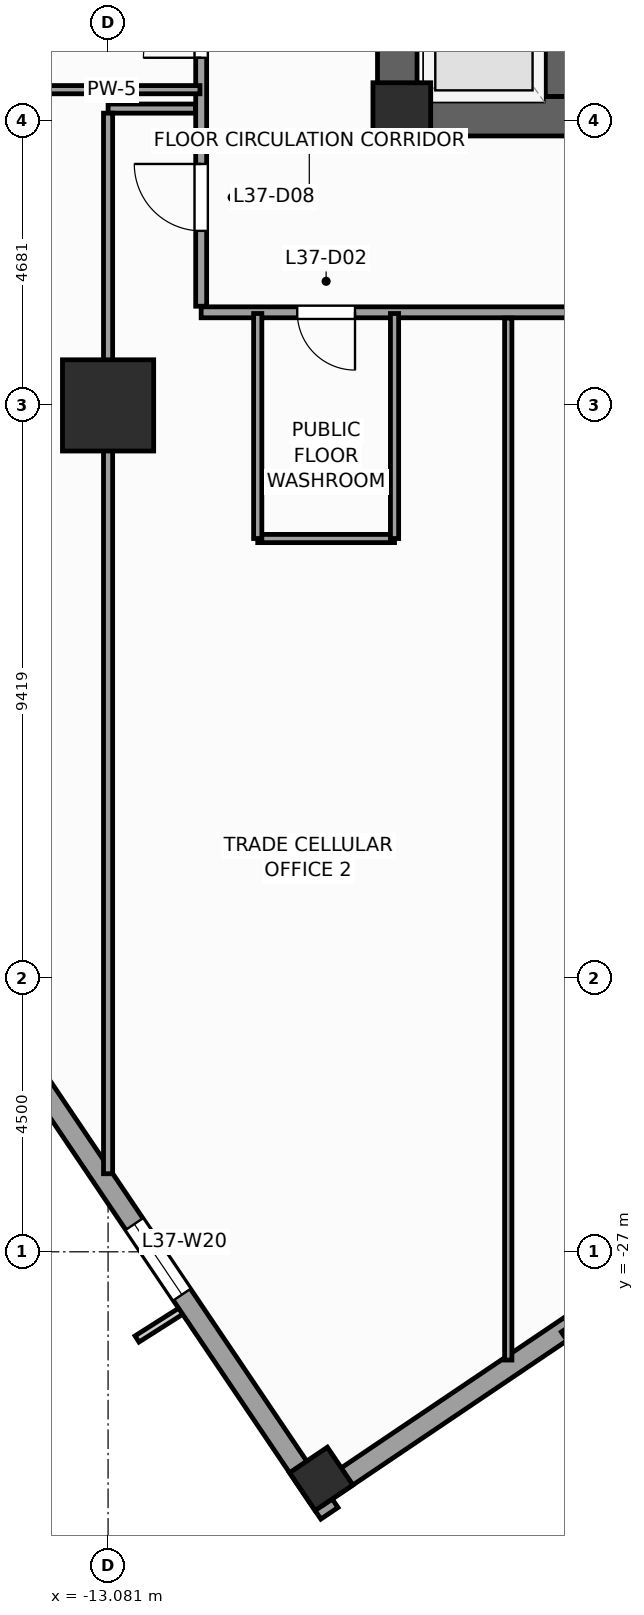
"""IFC4 building model, lengths in metres.
Left out: names, types, materials, properties, quantities, classifications, styles, units other than length and angle.
Written with IfcOpenShell. Run it as: python <this file> out.ifc"""

import sys

from ifc_helpers import new_model, si_unit, direction, frame, frame_2d, origin, origin_2d, place, context, subcontext, project, spatial, rectangle, extrude, source, transform, mapped, element, fill, save


model = new_model("IFC4")
c1 = context("Model", 3, precision=1e-05, world=origin(), true_north=direction((0.0, 1.0)))
c2 = subcontext(c1, "Body", "Model", "MODEL_VIEW")
j1 = project(units=[si_unit("LENGTHUNIT", "METRE"), si_unit("PLANEANGLEUNIT", "RADIAN")], contexts=[c1])
p1 = place(None, origin())
s1 = spatial("IfcSite", under=j1, at=p1, CompositionType="ELEMENT")
p2 = place(p1, origin())
s2 = spatial("IfcBuilding", under=s1, at=p2, CompositionType="ELEMENT")
p3 = place(p2, frame((0.0, 0.0, 156.4)))
s3 = spatial("IfcBuildingStorey", under=s2, at=p3, CompositionType="ELEMENT", Elevation=156.4)
p4 = place(p3, frame((-8.65, -8.325, 0.0), z_axis=(0.0, 0.0, 1.0), x_axis=(1.0, 0.0, 0.0)))
e1 = element("IfcWall", 1, at=p4, inside=s3, PredefinedType="SHEAR", context=c2, shape_type="SweptSolid", body=[
    extrude(rectangle(XDim=17.3, YDim=0.65, at=frame_2d((8.65, 0.0))), origin(), (0.0, 0.0, 1.0), 4.0),
])
p5 = place(p4, frame((8.0, 0.0, 0.0)))
e2 = element("IfcOpeningElement", 2, at=p5, cuts=e1, PredefinedType="OPENING", context=c2, shape_type="SweptSolid", body=[
    extrude(rectangle(XDim=1.3, YDim=2.2, at=frame_2d((0.65, 1.1))), frame((0.0, 0.335, 0.0), z_axis=(0.0, -1.0, 0.0), x_axis=(1.0, 0.0, 0.0)), (0.0, 0.0, 1.0), 0.67),
])
p6 = place(p3, frame((-8.325, -8.0, 0.0), z_axis=(0.0, 0.0, 1.0), x_axis=(0.0, 1.0, 0.0)))
e3 = element("IfcWall", 3, at=p6, inside=s3, PredefinedType="SHEAR", context=c2, shape_type="SweptSolid", body=[
    extrude(rectangle(XDim=16.0, YDim=0.65, at=frame_2d((8.0, 0.0))), origin(), (0.0, 0.0, 1.0), 4.0),
])
p7 = place(p6, frame((4.69, 0.0, 0.0)))
e4 = element("IfcOpeningElement", 4, at=p7, cuts=e3, PredefinedType="OPENING", context=c2, shape_type="SweptSolid", body=[
    extrude(rectangle(XDim=1.3, YDim=2.2, at=frame_2d((0.65, 1.1))), frame((0.0, 0.335, 0.0), z_axis=(0.0, -1.0, 0.0), x_axis=(1.0, 0.0, 0.0)), (0.0, 0.0, 1.0), 0.67),
])
p8 = place(p3, frame((-5.71, -8.0, 0.0), z_axis=(0.0, 0.0, 1.0), x_axis=(0.0, 1.0, 0.0)))
e5 = element("IfcWall", 5, at=p8, inside=s3, PredefinedType="SHEAR", context=c2, shape_type="SweptSolid", body=[
    extrude(rectangle(XDim=2.54, YDim=0.36, at=frame_2d((1.27, 0.0))), origin(), (0.0, 0.0, 1.0), 4.0),
])
m1 = source(origin(), c2, "Body", "SweptSolid", [
    extrude(rectangle(XDim=0.95, YDim=0.95, at=origin_2d()), origin(), (0.0, 0.0, 1.0), 4.0),
])
p9 = place(p3, frame((-8.25, -8.25, 0.0), z_axis=(0.0, 0.0, 1.0), x_axis=(1.0, 0.0, 0.0)))
e6 = element("IfcColumn", 6, at=p9, inside=s3, PredefinedType="PILASTER", context=c2, shape_type="MappedRepresentation", body=[
    mapped(m1, transform((0.0, 0.0, 0.0), scale=1.0)),
])
m2 = source(origin(), c2, "Body", "SweptSolid", [
    extrude(rectangle(XDim=1.5, YDim=1.5, at=origin_2d()), origin(), (0.0, 0.0, 1.0), 4.0),
])
p10 = place(p3, frame((-13.081, -13.081, 0.0), z_axis=(0.0, 0.0, 1.0), x_axis=(1.0, 0.0, 0.0)))
e7 = element("IfcColumn", 7, at=p10, inside=s3, PredefinedType="COLUMN", context=c2, shape_type="MappedRepresentation", body=[
    mapped(m2, transform((0.0, 0.0, 0.0), scale=1.0)),
])
m3 = source(origin(), c2, "Body", "SweptSolid", [
    extrude(rectangle(XDim=0.75, YDim=0.75, at=origin_2d()), origin(), (0.0, 0.0, 1.0), 4.0),
])
p11 = place(p3, frame((-9.576, -30.734, 0.0), z_axis=(0.0, 0.0, 1.0), x_axis=(0.829037572555, 0.559192903471, 0.0)))
e8 = element("IfcColumn", 8, at=p11, inside=s3, PredefinedType="COLUMN", context=c2, shape_type="MappedRepresentation", body=[
    mapped(m3, transform((0.0, 0.0, 0.0), scale=1.0)),
])
p12 = place(p3, frame((-32.558, 2.972, 0.0), z_axis=(0.0, 0.0, 1.0), x_axis=(0.559194910251, -0.829036218961, 0.0)))
e9 = element("IfcWall", 9, at=p12, inside=s3, PredefinedType="STANDARD", context=c2, shape_type="SweptSolid", body=[
    extrude(rectangle(XDim=41.34, YDim=0.34, at=frame_2d((20.67, 0.0))), origin(), (0.0, 0.0, 1.0), 3.04),
])
p13 = place(p12, frame((25.745, 0.0, 0.0)))
e10 = element("IfcOpeningElement", 10, at=p13, cuts=e9, PredefinedType="OPENING", context=c2, shape_type="SweptSolid", body=[
    extrude(rectangle(XDim=1.05, YDim=2.25, at=frame_2d((0.525, 1.125))), frame((0.0, 0.18, 0.0), z_axis=(0.0, -1.0, 0.0), x_axis=(1.0, 0.0, 0.0)), (0.0, 0.0, 1.0), 0.36),
])
p14 = place(p12, frame((5.761, 0.0, 0.56)))
e11 = element("IfcOpeningElement", 11, at=p14, cuts=e9, PredefinedType="OPENING", context=c2, shape_type="SweptSolid", body=[
    extrude(rectangle(XDim=1.4, YDim=2.4, at=frame_2d((0.7, 1.2))), frame((0.0, 0.18, 0.0), z_axis=(0.0, -1.0, 0.0), x_axis=(1.0, 0.0, 0.0)), (0.0, 0.0, 1.0), 0.36),
])
p15 = place(p12, frame((11.064, 0.0, 0.61)))
e12 = element("IfcOpeningElement", 12, at=p15, cuts=e9, PredefinedType="OPENING", context=c2, shape_type="SweptSolid", body=[
    extrude(rectangle(XDim=1.85, YDim=2.35, at=frame_2d((0.925, 1.175))), frame((0.0, 0.18, 0.0), z_axis=(0.0, -1.0, 0.0), x_axis=(1.0, 0.0, 0.0)), (0.0, 0.0, 1.0), 0.36),
])
p16 = place(p12, frame((18.168, 0.0, 0.61)))
e13 = element("IfcOpeningElement", 13, at=p16, cuts=e9, PredefinedType="OPENING", context=c2, shape_type="SweptSolid", body=[
    extrude(rectangle(XDim=1.85, YDim=2.35, at=frame_2d((0.925, 1.175))), frame((0.0, 0.18, 0.0), z_axis=(0.0, -1.0, 0.0), x_axis=(1.0, 0.0, 0.0)), (0.0, 0.0, 1.0), 0.36),
])
p17 = place(p12, frame((27.936, 0.0, 0.61)))
e14 = element("IfcOpeningElement", 14, at=p17, cuts=e9, PredefinedType="OPENING", context=c2, shape_type="SweptSolid", body=[
    extrude(rectangle(XDim=1.85, YDim=2.35, at=frame_2d((0.925, 1.175))), frame((0.0, 0.18, 0.0), z_axis=(0.0, -1.0, 0.0), x_axis=(1.0, 0.0, 0.0)), (0.0, 0.0, 1.0), 0.36),
])
p18 = place(p12, frame((35.602, 0.0, 0.56)))
e15 = element("IfcOpeningElement", 15, at=p18, cuts=e9, PredefinedType="OPENING", context=c2, shape_type="SweptSolid", body=[
    extrude(rectangle(XDim=1.4, YDim=2.4, at=frame_2d((0.7, 1.2))), frame((0.0, 0.18, 0.0), z_axis=(0.0, -1.0, 0.0), x_axis=(1.0, 0.0, 0.0)), (0.0, 0.0, 1.0), 0.36),
])
p19 = place(p3, frame((-9.631, -31.019, 0.0), z_axis=(0.0, 0.0, 1.0), x_axis=(0.829025804298, 0.559210350234, 0.0)))
e16 = element("IfcWall", 16, at=p19, inside=s3, PredefinedType="STANDARD", context=c2, shape_type="SweptSolid", body=[
    extrude(rectangle(XDim=5.0, YDim=0.34, at=frame_2d((2.5, 0.0))), origin(), (0.0, 0.0, 1.0), 3.74),
])
p20 = place(p3, frame((-5.486, -28.223, 0.0), z_axis=(0.0, 0.0, 1.0), x_axis=(0.559171107879, -0.82905227345, 0.0)))
e17 = element("IfcWall", 17, at=p20, inside=s3, PredefinedType="STANDARD", context=c2, shape_type="SweptSolid", body=[
    extrude(rectangle(XDim=5.17, YDim=0.34, at=frame_2d((2.585, 0.0))), origin(), (0.0, 0.0, 1.0), 3.04),
])
p21 = place(p20, frame((1.885, 0.0, 0.56)))
e18 = element("IfcOpeningElement", 18, at=p21, cuts=e17, PredefinedType="OPENING", context=c2, shape_type="SweptSolid", body=[
    extrude(rectangle(XDim=1.4, YDim=2.4, at=frame_2d((0.7, 1.2))), frame((0.0, 0.18, 0.0), z_axis=(0.0, -1.0, 0.0), x_axis=(1.0, 0.0, 0.0)), (0.0, 0.0, 1.0), 0.36),
])
p22 = place(p3, frame((-11.55, -11.55, 0.0), z_axis=(0.0, 0.0, 1.0), x_axis=(1.0, 0.0, 0.0)))
e19 = element("IfcWall", 19, at=p22, inside=s3, PredefinedType="PARTITIONING", context=c2, shape_type="SweptSolid", body=[
    extrude(rectangle(XDim=22.0, YDim=0.18, at=frame_2d((11.0, 0.0))), origin(), (0.0, 0.0, 1.0), 3.74),
])
p23 = place(p22, frame((1.58, 0.0, 0.0)))
e20 = element("IfcOpeningElement", 20, at=p23, cuts=e19, PredefinedType="OPENING", context=c2, shape_type="SweptSolid", body=[
    extrude(rectangle(XDim=0.95, YDim=2.1, at=frame_2d((0.475, 1.05))), frame((0.0, 0.1, 0.0), z_axis=(0.0, -1.0, 0.0), x_axis=(1.0, 0.0, 0.0)), (0.0, 0.0, 1.0), 0.2),
])
p24 = place(p22, frame((6.75, 0.0, 0.0)))
e21 = element("IfcOpeningElement", 21, at=p24, cuts=e19, PredefinedType="OPENING", context=c2, shape_type="SweptSolid", body=[
    extrude(rectangle(XDim=1.1, YDim=2.2, at=frame_2d((0.55, 1.1))), frame((0.0, 0.1, 0.0), z_axis=(0.0, -1.0, 0.0), x_axis=(1.0, 0.0, 0.0)), (0.0, 0.0, 1.0), 0.2),
])
p25 = place(p22, frame((11.25, 0.0, 0.0)))
e22 = element("IfcOpeningElement", 22, at=p25, cuts=e19, PredefinedType="OPENING", context=c2, shape_type="SweptSolid", body=[
    extrude(rectangle(XDim=1.1, YDim=2.2, at=frame_2d((0.55, 1.1))), frame((0.0, 0.1, 0.0), z_axis=(0.0, -1.0, 0.0), x_axis=(1.0, 0.0, 0.0)), (0.0, 0.0, 1.0), 0.2),
])
p26 = place(p22, frame((15.75, 0.0, 0.0)))
e23 = element("IfcOpeningElement", 23, at=p26, cuts=e19, PredefinedType="OPENING", context=c2, shape_type="SweptSolid", body=[
    extrude(rectangle(XDim=1.1, YDim=2.2, at=frame_2d((0.55, 1.1))), frame((0.0, 0.1, 0.0), z_axis=(0.0, -1.0, 0.0), x_axis=(1.0, 0.0, 0.0)), (0.0, 0.0, 1.0), 0.2),
])
p27 = place(p22, frame((19.561, 0.0, 0.0)))
e24 = element("IfcOpeningElement", 24, at=p27, cuts=e19, PredefinedType="OPENING", context=c2, shape_type="SweptSolid", body=[
    extrude(rectangle(XDim=1.1, YDim=2.2, at=frame_2d((0.55, 1.1))), frame((0.0, 0.1, 0.0), z_axis=(0.0, -1.0, 0.0), x_axis=(1.0, 0.0, 0.0)), (0.0, 0.0, 1.0), 0.2),
])
p28 = place(p3, frame((-11.55, -11.45, 0.0), z_axis=(0.0, 0.0, 1.0), x_axis=(0.0, 1.0, 0.0)))
e25 = element("IfcWall", 25, at=p28, inside=s3, PredefinedType="PARTITIONING", context=c2, shape_type="SweptSolid", body=[
    extrude(rectangle(XDim=13.05, YDim=0.18, at=frame_2d((6.525, 0.0))), origin(), (0.0, 0.0, 1.0), 3.74),
])
p29 = place(p28, frame((4.086, 0.0, 0.0)))
e26 = element("IfcOpeningElement", 26, at=p29, cuts=e25, PredefinedType="OPENING", context=c2, shape_type="SweptSolid", body=[
    extrude(rectangle(XDim=0.95, YDim=2.1, at=frame_2d((0.475, 1.05))), frame((0.0, 0.1, 0.0), z_axis=(0.0, -1.0, 0.0), x_axis=(1.0, 0.0, 0.0)), (0.0, 0.0, 1.0), 0.2),
])
p30 = place(p28, frame((11.01, 0.0, 0.0)))
e27 = element("IfcOpeningElement", 27, at=p30, cuts=e25, PredefinedType="OPENING", context=c2, shape_type="SweptSolid", body=[
    extrude(rectangle(XDim=1.1, YDim=2.2, at=frame_2d((0.55, 1.1))), frame((0.0, 0.1, 0.0), z_axis=(0.0, -1.0, 0.0), x_axis=(1.0, 0.0, 0.0)), (0.0, 0.0, 1.0), 0.2),
])
p31 = place(p28, frame((8.775, 0.0, 0.0)))
e28 = element("IfcOpeningElement", 28, at=p31, cuts=e25, PredefinedType="OPENING", context=c2, shape_type="SweptSolid", body=[
    extrude(rectangle(XDim=1.1, YDim=2.2, at=frame_2d((0.55, 1.1))), frame((0.0, 0.1, 0.0), z_axis=(0.0, -1.0, 0.0), x_axis=(1.0, 0.0, 0.0)), (0.0, 0.0, 1.0), 0.2),
])
p32 = place(p28, frame((6.35, 0.0, 0.0)))
e29 = element("IfcOpeningElement", 29, at=p32, cuts=e25, PredefinedType="OPENING", context=c2, shape_type="SweptSolid", body=[
    extrude(rectangle(XDim=1.1, YDim=2.2, at=frame_2d((0.55, 1.1))), frame((0.0, 0.1, 0.0), z_axis=(0.0, -1.0, 0.0), x_axis=(1.0, 0.0, 0.0)), (0.0, 0.0, 1.0), 0.2),
])
p33 = place(p28, frame((1.24, 0.0, 0.0)))
e30 = element("IfcOpeningElement", 30, at=p33, cuts=e25, PredefinedType="OPENING", context=c2, shape_type="SweptSolid", body=[
    extrude(rectangle(XDim=1.1, YDim=2.2, at=frame_2d((0.55, 1.1))), frame((0.0, 0.1, 0.0), z_axis=(0.0, -1.0, 0.0), x_axis=(1.0, 0.0, 0.0)), (0.0, 0.0, 1.0), 0.2),
])
p34 = place(p3, frame((-11.645, -8.2, 0.0), z_axis=(0.0, 0.0, 1.0), x_axis=(-1.0, 0.0, 0.0)))
e31 = element("IfcWall", 31, at=p34, inside=s3, PredefinedType="PARTITIONING", context=c2, shape_type="SweptSolid", body=[
    extrude(rectangle(XDim=1.436, YDim=0.15, at=frame_2d((0.718, 0.0))), origin(), (0.0, 0.0, 1.0), 3.74),
])
p35 = place(p3, frame((-13.081, -8.275, 0.0), z_axis=(0.0, 0.0, 1.0), x_axis=(0.0, -1.0, 0.0)))
e32 = element("IfcWall", 32, at=p35, inside=s3, PredefinedType="PARTITIONING", context=c2, shape_type="SweptSolid", body=[
    extrude(rectangle(XDim=17.441, YDim=0.15, at=frame_2d((8.721, 0.0))), origin(), (0.0, 0.0, 1.0), 2.84),
])
p36 = place(p3, frame((-6.5, -28.78, 0.0), z_axis=(0.0, 0.0, 1.0), x_axis=(0.0, 1.0, 0.0)))
e33 = element("IfcWall", 33, at=p36, inside=s3, PredefinedType="PARTITIONING", context=c2, shape_type="SweptSolid", body=[
    extrude(rectangle(XDim=17.135, YDim=0.12, at=frame_2d((8.567, 0.0))), origin(), (0.0, 0.0, 1.0), 3.74),
])
p37 = place(p3, frame((-14.47, -7.889, 0.0), z_axis=(0.0, 0.0, 1.0), x_axis=(1.0, 0.0, 0.0)))
e34 = element("IfcWall", 34, at=p37, inside=s3, PredefinedType="PARTITIONING", context=c2, shape_type="SweptSolid", body=[
    extrude(rectangle(XDim=2.9, YDim=0.135, at=frame_2d((1.45, 0.0))), origin(), (0.0, 0.0, 1.0), 3.74),
])
p38 = place(p3, frame((-10.62, -15.27, 0.0), z_axis=(0.0, 0.0, 1.0), x_axis=(1.0, 0.0, 0.0)))
e35 = element("IfcWall", 35, at=p38, inside=s3, PredefinedType="PARTITIONING", context=c2, shape_type="SweptSolid", body=[
    extrude(rectangle(XDim=2.25, YDim=0.135, at=frame_2d((1.125, 0.0))), origin(), (0.0, 0.0, 1.0), 3.74),
])
for number, where, z_axis, x_axis in (
    (36, (-8.37, -15.27, 0.0), (0.0, 0.0, 1.0), (0.0, 1.0, 0.0)),
    (37, (-10.62, -15.27, 0.0), (0.0, 0.0, 1.0), (0.0, 1.0, 0.0)),
):
    element("IfcWall", number, at=place(p3, frame(where, z_axis=z_axis, x_axis=x_axis)), inside=s3, PredefinedType="PARTITIONING", context=c2, shape_type="SweptSolid", body=[
        extrude(rectangle(XDim=3.7, YDim=0.135, at=frame_2d((1.85, 0.0))), origin(), (0.0, 0.0, 1.0), 3.74),
    ])
m4 = source(origin(), c2, "Body", "SweptSolid", [
    extrude(rectangle(XDim=1.4, YDim=2.4, at=frame_2d((0.7, 1.2))), frame((0.0, 0.03, 0.0), z_axis=(0.0, -1.0, 0.0), x_axis=(1.0, 0.0, 0.0)), (0.0, 0.0, 1.0), 0.06),
])
p39 = place(p18, origin())
e38 = element("IfcWindow", 38, at=p39, inside=s3, PartitioningType="SINGLE_PANEL", PredefinedType="WINDOW", context=c2, shape_type="MappedRepresentation", body=[
    mapped(m4, transform((0.0, 0.0, 0.0), scale=1.0)),
])
fill(e15, e38)
m5 = source(origin(), c2, "Body", "SweptSolid", [
    extrude(rectangle(XDim=0.95, YDim=2.1, at=frame_2d((0.475, 1.05))), frame((0.0, 0.025, 0.0), z_axis=(0.0, -1.0, 0.0), x_axis=(1.0, 0.0, 0.0)), (0.0, 0.0, 1.0), 0.05),
])
p40 = place(p29, origin())
e39 = element("IfcDoor", 39, at=p40, inside=s3, OperationType="SINGLE_SWING_LEFT", PredefinedType="DOOR", context=c2, shape_type="MappedRepresentation", body=[
    mapped(m5, transform((0.0, 0.0, 0.0), scale=1.0)),
])
fill(e26, e39)
p41 = place(p23, frame((0.95, 0.0, 0.0), z_axis=(0.0, 0.0, 1.0), x_axis=(-1.0, 0.0, 0.0)))
e40 = element("IfcDoor", 40, at=p41, inside=s3, OperationType="SINGLE_SWING_RIGHT", PredefinedType="DOOR", context=c2, shape_type="MappedRepresentation", body=[
    mapped(m5, transform((0.0, 0.0, 0.0), scale=1.0)),
])
fill(e20, e40)
m6 = source(origin(), c2, "Body", "SweptSolid", [
    extrude(rectangle(XDim=1.1, YDim=2.2, at=frame_2d((0.55, 1.1))), frame((0.0, 0.025, 0.0), z_axis=(0.0, -1.0, 0.0), x_axis=(1.0, 0.0, 0.0)), (0.0, 0.0, 1.0), 0.05),
])
p42 = place(p33, origin())
e41 = element("IfcDoor", 41, at=p42, inside=s3, OperationType="SINGLE_SWING_RIGHT", PredefinedType="DOOR", context=c2, shape_type="MappedRepresentation", body=[
    mapped(m6, transform((0.0, 0.0, 0.0), scale=1.0)),
])
fill(e30, e41)
save(model, sys.argv[1])
